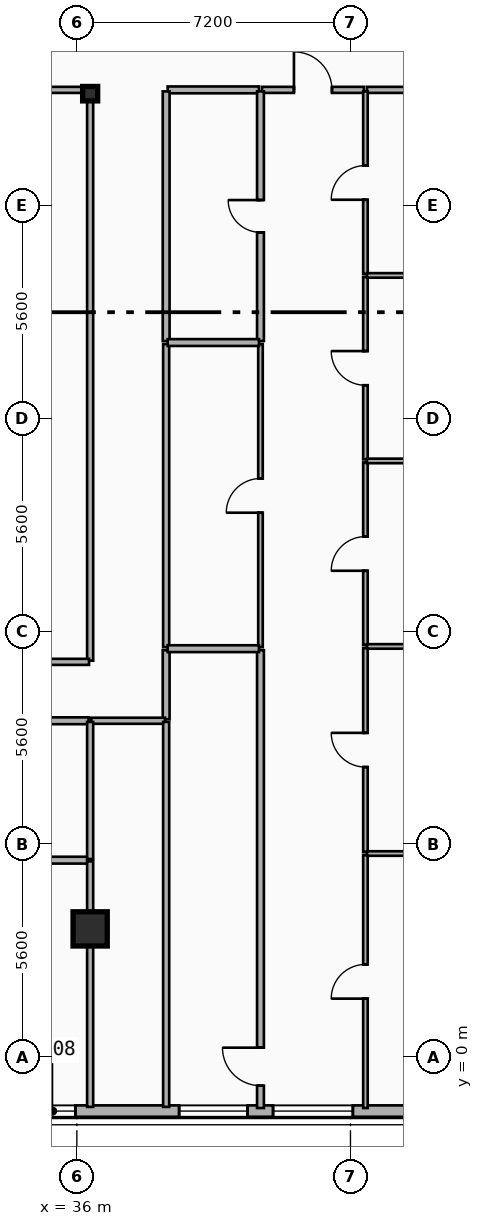
"""IFC4 building model, lengths in metres.
Left out: names, types, materials, properties, quantities, classifications, styles, units other than length and angle.
Written with IfcOpenShell. Run it as: python <this file> out.ifc"""

import sys

from ifc_helpers import new_model, si_unit, direction, frame, frame_2d, origin, origin_2d, place, context, subcontext, project, spatial, rectangle, i_section, extrude, element, fill, save


model = new_model("IFC4")
c1 = context("Model", 3, precision=1e-05, world=origin(), true_north=direction((0.0, 1.0)))
c2 = subcontext(c1, "Body", "Model", "MODEL_VIEW")
j1 = project(units=[si_unit("LENGTHUNIT", "METRE"), si_unit("PLANEANGLEUNIT", "RADIAN")], contexts=[c1])
p1 = place(None, origin())
s1 = spatial("IfcSite", under=j1, at=p1, CompositionType="ELEMENT")
p2 = place(p1, origin())
s2 = spatial("IfcBuilding", under=s1, at=p2, CompositionType="ELEMENT")
p3 = place(p2, frame((0.0, 0.0, 251.0)))
s3 = spatial("IfcBuildingStorey", under=s2, at=p3, CompositionType="ELEMENT", Elevation=251.0)
p4 = place(p3, frame((36.35, 25.35, 0.0), z_axis=(0.0, 0.0, 1.0), x_axis=(1.0, 0.0, 0.0)))
e1 = element("IfcColumn", 1, at=p4, inside=s3, PredefinedType="COLUMN", context=c2, shape_type="SweptSolid", body=[
    extrude(i_section(OverallWidth=0.395, OverallDepth=0.38, WebThickness=0.019, FlangeThickness=0.03, FilletRadius=0.015, at=origin_2d()), origin(), (0.0, 0.0, 1.0), 3.7),
])
p5 = place(p3, frame((36.35, 3.482, 0.0), z_axis=(0.0, -0.090227632116, 0.995921168769), x_axis=(1.0, 0.0, 0.0)))
e2 = element("IfcColumn", 2, at=p5, inside=s3, PredefinedType="COLUMN", context=c2, shape_type="SweptSolid", body=[
    extrude(rectangle(XDim=0.9, YDim=0.9, at=origin_2d()), origin(), (0.0, 0.0, 1.0), 3.715),
])
p6 = place(p3, frame((45.2, -1.42, 0.0), z_axis=(0.0, 0.0, 1.0), x_axis=(-1.0, 0.0, 0.0)))
e3 = element("IfcWall", 3, at=p6, inside=s3, PredefinedType="SOLIDWALL", context=c2, shape_type="SweptSolid", body=[
    extrude(rectangle(XDim=32.8, YDim=0.3, at=frame_2d((16.4, 0.0))), origin(), (0.0, 0.0, 1.0), 3.42),
])
p7 = place(p6, frame((29.071, 0.0, 0.75)))
e4 = element("IfcOpeningElement", 4, at=p7, cuts=e3, PredefinedType="OPENING", context=c2, shape_type="SweptSolid", body=[
    extrude(rectangle(XDim=2.1, YDim=2.1, at=frame_2d((1.05, 1.05))), frame((0.0, 0.16, 0.0), z_axis=(0.0, -1.0, 0.0), x_axis=(1.0, 0.0, 0.0)), (0.0, 0.0, 1.0), 0.32),
])
p8 = place(p6, frame((26.745, 0.0, 0.75)))
e5 = element("IfcOpeningElement", 5, at=p8, cuts=e3, PredefinedType="OPENING", context=c2, shape_type="SweptSolid", body=[
    extrude(rectangle(XDim=1.6, YDim=1.95, at=frame_2d((0.8, 0.975))), frame((0.0, 0.16, 0.0), z_axis=(0.0, -1.0, 0.0), x_axis=(1.0, 0.0, 0.0)), (0.0, 0.0, 1.0), 0.32),
])
p9 = place(p6, frame((18.105, 0.0, 0.75)))
e6 = element("IfcOpeningElement", 6, at=p9, cuts=e3, PredefinedType="OPENING", context=c2, shape_type="SweptSolid", body=[
    extrude(rectangle(XDim=2.1, YDim=2.1, at=frame_2d((1.05, 1.05))), frame((0.0, 0.16, 0.0), z_axis=(0.0, -1.0, 0.0), x_axis=(1.0, 0.0, 0.0)), (0.0, 0.0, 1.0), 0.32),
])
p10 = place(p6, frame((21.762, 0.0, 0.75)))
e7 = element("IfcOpeningElement", 7, at=p10, cuts=e3, PredefinedType="OPENING", context=c2, shape_type="SweptSolid", body=[
    extrude(rectangle(XDim=2.1, YDim=2.1, at=frame_2d((1.05, 1.05))), frame((0.0, 0.16, 0.0), z_axis=(0.0, -1.0, 0.0), x_axis=(1.0, 0.0, 0.0)), (0.0, 0.0, 1.0), 0.32),
])
p11 = place(p6, frame((11.364, 0.0, 0.75)))
e8 = element("IfcOpeningElement", 8, at=p11, cuts=e3, PredefinedType="OPENING", context=c2, shape_type="SweptSolid", body=[
    extrude(rectangle(XDim=2.1, YDim=2.1, at=frame_2d((1.05, 1.05))), frame((0.0, 0.16, 0.0), z_axis=(0.0, -1.0, 0.0), x_axis=(1.0, 0.0, 0.0)), (0.0, 0.0, 1.0), 0.32),
])
p12 = place(p6, frame((9.238, 0.0, 0.68)))
e9 = element("IfcOpeningElement", 9, at=p12, cuts=e3, PredefinedType="OPENING", context=c2, shape_type="SweptSolid", body=[
    extrude(rectangle(XDim=1.2, YDim=1.5, at=frame_2d((0.6, 0.75))), frame((0.0, 0.16, 0.0), z_axis=(0.0, -1.0, 0.0), x_axis=(1.0, 0.0, 0.0)), (0.0, 0.0, 1.0), 0.32),
])
p13 = place(p6, frame((14.669, 0.0, 0.75)))
e10 = element("IfcOpeningElement", 10, at=p13, cuts=e3, PredefinedType="OPENING", context=c2, shape_type="SweptSolid", body=[
    extrude(rectangle(XDim=2.1, YDim=2.1, at=frame_2d((1.05, 1.05))), frame((0.0, 0.16, 0.0), z_axis=(0.0, -1.0, 0.0), x_axis=(1.0, 0.0, 0.0)), (0.0, 0.0, 1.0), 0.32),
])
p14 = place(p6, frame((1.937, 0.0, 0.75)))
e11 = element("IfcOpeningElement", 11, at=p14, cuts=e3, PredefinedType="OPENING", context=c2, shape_type="SweptSolid", body=[
    extrude(rectangle(XDim=2.1, YDim=2.1, at=frame_2d((1.05, 1.05))), frame((0.0, 0.16, 0.0), z_axis=(0.0, -1.0, 0.0), x_axis=(1.0, 0.0, 0.0)), (0.0, 0.0, 1.0), 0.32),
])
p15 = place(p6, frame((4.709, 0.0, 0.8)))
e12 = element("IfcOpeningElement", 12, at=p15, cuts=e3, PredefinedType="OPENING", context=c2, shape_type="SweptSolid", body=[
    extrude(rectangle(XDim=1.8, YDim=1.8, at=frame_2d((0.9, 0.9))), frame((0.0, 0.16, 0.0), z_axis=(0.0, -1.0, 0.0), x_axis=(1.0, 0.0, 0.0)), (0.0, 0.0, 1.0), 0.32),
])
p16 = place(p3, frame((40.872, 25.45, 0.0), z_axis=(0.0, 0.0, 1.0), x_axis=(1.0, 0.0, 0.0)))
e13 = element("IfcWall", 13, at=p16, inside=s3, PredefinedType="PARTITIONING", context=c2, shape_type="SweptSolid", body=[
    extrude(rectangle(XDim=2.682, YDim=0.16, at=frame_2d((1.341, 0.0))), origin(), (0.0, 0.0, 1.0), 3.42),
])
p17 = place(p16, frame((0.841, 0.0, 0.0)))
e14 = element("IfcOpeningElement", 14, at=p17, cuts=e13, PredefinedType="OPENING", context=c2, shape_type="SweptSolid", body=[
    extrude(rectangle(XDim=1.0, YDim=2.15, at=frame_2d((0.5, 1.075))), frame((0.0, 0.09, 0.0), z_axis=(0.0, -1.0, 0.0), x_axis=(1.0, 0.0, 0.0)), (0.0, 0.0, 1.0), 0.18),
])
p18 = place(p3, frame((38.39, 25.45, 0.0), z_axis=(0.0, 0.0, 1.0), x_axis=(1.0, 0.0, 0.0)))
e15 = element("IfcWall", 15, at=p18, inside=s3, PredefinedType="PLUMBINGWALL", context=c2, shape_type="SweptSolid", body=[
    extrude(rectangle(XDim=2.402, YDim=0.18, at=frame_2d((1.201, 0.0))), origin(), (0.0, 0.0, 1.0), 3.42),
])
p19 = place(p3, frame((43.634, 25.45, 0.0), z_axis=(0.0, 0.0, 1.0), x_axis=(1.0, 0.0, 0.0)))
e16 = element("IfcWall", 16, at=p19, inside=s3, PredefinedType="PARTITIONING", context=c2, shape_type="SweptSolid", body=[
    extrude(rectangle(XDim=5.506, YDim=0.16, at=frame_2d((2.753, 0.0))), origin(), (0.0, 0.0, 1.0), 2.7),
])
p20 = place(p3, frame((38.35, 8.89, 0.0), z_axis=(0.0, 0.0, 1.0), x_axis=(0.0, 1.0, 0.0)))
e17 = element("IfcWall", 17, at=p20, inside=s3, PredefinedType="PLUMBINGWALL", context=c2, shape_type="SweptSolid", body=[
    extrude(rectangle(XDim=1.817, YDim=0.18, at=frame_2d((0.909, 0.0))), origin(), (0.0, 0.0, 1.0), 2.9),
])
p21 = place(p3, frame((38.35, 10.787, 0.0), z_axis=(0.0, 0.0, 1.0), x_axis=(0.0, 1.0, 0.0)))
e18 = element("IfcWall", 18, at=p21, inside=s3, PredefinedType="PARTITIONING", context=c2, shape_type="SweptSolid", body=[
    extrude(rectangle(XDim=7.975, YDim=0.16, at=frame_2d((3.987, 0.0))), origin(), (0.0, 0.0, 1.0), 2.9),
])
p22 = place(p3, frame((38.35, 18.842, 0.0), z_axis=(0.0, 0.0, 1.0), x_axis=(0.0, 1.0, 0.0)))
e19 = element("IfcWall", 19, at=p22, inside=s3, PredefinedType="PLUMBINGWALL", context=c2, shape_type="SweptSolid", body=[
    extrude(rectangle(XDim=6.568, YDim=0.18, at=frame_2d((3.284, 0.0))), origin(), (0.0, 0.0, 1.0), 2.9),
])
for number, where, z_axis, x_axis in (
    (20, (34.415, 8.85, 0.0), (0.0, 0.0, 1.0), (1.0, 0.0, 0.0)),
    (21, (34.415, 5.182, 0.0), (0.0, 0.0, 1.0), (1.0, 0.0, 0.0)),
):
    element("IfcWall", number, at=place(p3, frame(where, z_axis=z_axis, x_axis=x_axis)), inside=s3, PredefinedType="PLUMBINGWALL", context=c2, shape_type="SweptSolid", body=[
        extrude(rectangle(XDim=1.895, YDim=0.18, at=frame_2d((0.948, 0.0))), origin(), (0.0, 0.0, 1.0), 2.7),
    ])
p23 = place(p3, frame((40.832, -1.34, 0.0), z_axis=(0.0, 0.0, 1.0), x_axis=(0.0, 1.0, 0.0)))
e22 = element("IfcWall", 22, at=p23, inside=s3, PredefinedType="PLUMBINGWALL", context=c2, shape_type="SweptSolid", body=[
    extrude(rectangle(XDim=12.047, YDim=0.18, at=frame_2d((6.023, 0.0))), origin(), (0.0, 0.0, 1.0), 2.9),
])
p24 = place(p23, frame((0.589, 0.0, 0.0)))
e23 = element("IfcOpeningElement", 23, at=p24, cuts=e22, PredefinedType="OPENING", context=c2, shape_type="SweptSolid", body=[
    extrude(rectangle(XDim=1.0, YDim=2.15, at=frame_2d((0.5, 1.075))), frame((0.0, 0.1, 0.0), z_axis=(0.0, -1.0, 0.0), x_axis=(1.0, 0.0, 0.0)), (0.0, 0.0, 1.0), 0.2),
])
p25 = place(p3, frame((40.832, 10.787, 0.0), z_axis=(0.0, 0.0, 1.0), x_axis=(0.0, 1.0, 0.0)))
e24 = element("IfcWall", 24, at=p25, inside=s3, PredefinedType="PARTITIONING", context=c2, shape_type="SweptSolid", body=[
    extrude(rectangle(XDim=7.975, YDim=0.12, at=frame_2d((3.987, 0.0))), origin(), (0.0, 0.0, 1.0), 2.9),
])
p26 = place(p25, frame((3.538, 0.0, 0.0)))
e25 = element("IfcOpeningElement", 25, at=p26, cuts=e24, PredefinedType="OPENING", context=c2, shape_type="SweptSolid", body=[
    extrude(rectangle(XDim=0.9, YDim=2.1, at=frame_2d((0.45, 1.05))), frame((0.0, 0.07, 0.0), z_axis=(0.0, -1.0, 0.0), x_axis=(1.0, 0.0, 0.0)), (0.0, 0.0, 1.0), 0.14),
])
p27 = place(p3, frame((40.832, 18.842, 0.0), z_axis=(0.0, 0.0, 1.0), x_axis=(0.0, 1.0, 0.0)))
e26 = element("IfcWall", 26, at=p27, inside=s3, PredefinedType="PLUMBINGWALL", context=c2, shape_type="SweptSolid", body=[
    extrude(rectangle(XDim=6.568, YDim=0.18, at=frame_2d((3.284, 0.0))), origin(), (0.0, 0.0, 1.0), 2.9),
])
p28 = place(p27, frame((2.859, 0.0, 0.0)))
e27 = element("IfcOpeningElement", 27, at=p28, cuts=e26, PredefinedType="OPENING", context=c2, shape_type="SweptSolid", body=[
    extrude(rectangle(XDim=0.85, YDim=2.1, at=frame_2d((0.425, 1.05))), frame((0.0, 0.1, 0.0), z_axis=(0.0, -1.0, 0.0), x_axis=(1.0, 0.0, 0.0)), (0.0, 0.0, 1.0), 0.2),
])
p29 = place(p3, frame((43.594, -1.34, 0.0), z_axis=(0.0, 0.0, 1.0), x_axis=(0.0, 1.0, 0.0)))
e28 = element("IfcWall", 28, at=p29, inside=s3, PredefinedType="PARTITIONING", context=c2, shape_type="SweptSolid", body=[
    extrude(rectangle(XDim=6.657, YDim=0.12, at=frame_2d((3.329, 0.0))), origin(), (0.0, 0.0, 1.0), 3.08),
])
p30 = place(p29, frame((2.878, 0.0, 0.0)))
e29 = element("IfcOpeningElement", 29, at=p30, cuts=e28, PredefinedType="OPENING", context=c2, shape_type="SweptSolid", body=[
    extrude(rectangle(XDim=0.9, YDim=2.1, at=frame_2d((0.45, 1.05))), frame((0.0, 0.07, 0.0), z_axis=(0.0, -1.0, 0.0), x_axis=(1.0, 0.0, 0.0)), (0.0, 0.0, 1.0), 0.14),
])
p31 = place(p3, frame((43.594, 5.397, 0.0), z_axis=(0.0, 0.0, 1.0), x_axis=(0.0, 1.0, 0.0)))
e30 = element("IfcWall", 30, at=p31, inside=s3, PredefinedType="PARTITIONING", context=c2, shape_type="SweptSolid", body=[
    extrude(rectangle(XDim=5.369, YDim=0.12, at=frame_2d((2.685, 0.0))), origin(), (0.0, 0.0, 1.0), 2.9),
])
p32 = place(p31, frame((2.235, 0.0, 0.0)))
e31 = element("IfcOpeningElement", 31, at=p32, cuts=e30, PredefinedType="OPENING", context=c2, shape_type="SweptSolid", body=[
    extrude(rectangle(XDim=0.9, YDim=2.1, at=frame_2d((0.45, 1.05))), frame((0.0, 0.07, 0.0), z_axis=(0.0, -1.0, 0.0), x_axis=(1.0, 0.0, 0.0)), (0.0, 0.0, 1.0), 0.14),
])
p33 = place(p3, frame((43.594, 10.846, 0.0), z_axis=(0.0, 0.0, 1.0), x_axis=(0.0, 1.0, 0.0)))
e32 = element("IfcWall", 32, at=p33, inside=s3, PredefinedType="PARTITIONING", context=c2, shape_type="SweptSolid", body=[
    extrude(rectangle(XDim=4.801, YDim=0.12, at=frame_2d((2.4, 0.0))), origin(), (0.0, 0.0, 1.0), 2.9),
])
p34 = place(p33, frame((1.95, 0.0, 0.0)))
e33 = element("IfcOpeningElement", 33, at=p34, cuts=e32, PredefinedType="OPENING", context=c2, shape_type="SweptSolid", body=[
    extrude(rectangle(XDim=0.9, YDim=2.1, at=frame_2d((0.45, 1.05))), frame((0.0, 0.07, 0.0), z_axis=(0.0, -1.0, 0.0), x_axis=(1.0, 0.0, 0.0)), (0.0, 0.0, 1.0), 0.14),
])
p35 = place(p3, frame((43.594, 15.727, 0.0), z_axis=(0.0, 0.0, 1.0), x_axis=(0.0, 1.0, 0.0)))
e34 = element("IfcWall", 34, at=p35, inside=s3, PredefinedType="PARTITIONING", context=c2, shape_type="SweptSolid", body=[
    extrude(rectangle(XDim=4.801, YDim=0.12, at=frame_2d((2.4, 0.0))), origin(), (0.0, 0.0, 1.0), 2.9),
])
p36 = place(p35, frame((1.95, 0.0, 0.0)))
e35 = element("IfcOpeningElement", 35, at=p36, cuts=e34, PredefinedType="OPENING", context=c2, shape_type="SweptSolid", body=[
    extrude(rectangle(XDim=0.9, YDim=2.1, at=frame_2d((0.45, 1.05))), frame((0.0, 0.07, 0.0), z_axis=(0.0, -1.0, 0.0), x_axis=(1.0, 0.0, 0.0)), (0.0, 0.0, 1.0), 0.14),
])
p37 = place(p3, frame((43.594, 20.608, 0.0), z_axis=(0.0, 0.0, 1.0), x_axis=(0.0, 1.0, 0.0)))
e36 = element("IfcWall", 36, at=p37, inside=s3, PredefinedType="PARTITIONING", context=c2, shape_type="SweptSolid", body=[
    extrude(rectangle(XDim=4.802, YDim=0.12, at=frame_2d((2.401, 0.0))), origin(), (0.0, 0.0, 1.0), 3.05),
])
p38 = place(p37, frame((1.951, 0.0, 0.0)))
e37 = element("IfcOpeningElement", 37, at=p38, cuts=e36, PredefinedType="OPENING", context=c2, shape_type="SweptSolid", body=[
    extrude(rectangle(XDim=0.9, YDim=2.1, at=frame_2d((0.45, 1.05))), frame((0.0, 0.07, 0.0), z_axis=(0.0, -1.0, 0.0), x_axis=(1.0, 0.0, 0.0)), (0.0, 0.0, 1.0), 0.14),
])
for number, where, z_axis, x_axis in (
    (38, (38.39, 10.747, 0.0), (0.0, 0.0, 1.0), (1.0, 0.0, 0.0)),
    (39, (38.39, 18.802, 0.0), (0.0, 0.0, 1.0), (1.0, 0.0, 0.0)),
):
    element("IfcWall", number, at=place(p3, frame(where, z_axis=z_axis, x_axis=x_axis)), inside=s3, PredefinedType="PLUMBINGWALL", context=c2, shape_type="SweptSolid", body=[
        extrude(rectangle(XDim=2.402, YDim=0.18, at=frame_2d((1.201, 0.0))), origin(), (0.0, 0.0, 1.0), 2.9),
    ])
for number, where, z_axis, x_axis in (
    (40, (43.634, 5.357, 0.0), (0.0, 0.0, 1.0), (1.0, 0.0, 0.0)),
    (41, (43.634, 10.806, 0.0), (0.0, 0.0, 1.0), (1.0, 0.0, 0.0)),
    (42, (43.634, 15.687, 0.0), (0.0, 0.0, 1.0), (1.0, 0.0, 0.0)),
    (43, (43.634, 20.568, 0.0), (0.0, 0.0, 1.0), (1.0, 0.0, 0.0)),
):
    element("IfcWall", number, at=place(p3, frame(where, z_axis=z_axis, x_axis=x_axis)), inside=s3, PredefinedType="PARTITIONING", context=c2, shape_type="SweptSolid", body=[
        extrude(rectangle(XDim=5.506, YDim=0.12, at=frame_2d((2.753, 0.0))), origin(), (0.0, 0.0, 1.0), 2.7),
    ])
p39 = place(p3, frame((20.48, 25.45, 0.0), z_axis=(0.0, 0.0, 1.0), x_axis=(1.0, 0.0, 0.0)))
e44 = element("IfcWall", 44, at=p39, inside=s3, PredefinedType="PARTITIONING", context=c2, shape_type="SweptSolid", body=[
    extrude(rectangle(XDim=15.84, YDim=0.16, at=frame_2d((7.92, 0.0))), origin(), (0.0, 0.0, 1.0), 2.7),
])
p40 = place(p3, frame((36.38, 8.85, 0.0), z_axis=(0.0, 0.0, 1.0), x_axis=(1.0, 0.0, 0.0)))
e45 = element("IfcWall", 45, at=p40, inside=s3, PredefinedType="PARTITIONING", context=c2, shape_type="SweptSolid", body=[
    extrude(rectangle(XDim=1.94, YDim=0.16, at=frame_2d((0.97, 0.0))), origin(), (0.0, 0.0, 1.0), 2.7),
])
p41 = place(p3, frame((36.35, 10.43, 0.0), z_axis=(0.0, 0.0, 1.0), x_axis=(0.0, 1.0, 0.0)))
e46 = element("IfcWall", 46, at=p41, inside=s3, PredefinedType="PARTITIONING", context=c2, shape_type="SweptSolid", body=[
    extrude(rectangle(XDim=14.99, YDim=0.16, at=frame_2d((7.495, 0.0))), origin(), (0.0, 0.0, 1.0), 2.7),
])
p42 = place(p3, frame((34.48, 10.4, 0.0), z_axis=(0.0, 0.0, 1.0), x_axis=(1.0, 0.0, 0.0)))
e47 = element("IfcWall", 47, at=p42, inside=s3, PredefinedType="PARTITIONING", context=c2, shape_type="SweptSolid", body=[
    extrude(rectangle(XDim=1.84, YDim=0.16, at=frame_2d((0.92, 0.0))), origin(), (0.0, 0.0, 1.0), 2.7),
])
p43 = place(p3, frame((36.35, -1.31, 0.0), z_axis=(0.0, 0.0, 1.0), x_axis=(0.0, 1.0, 0.0)))
e48 = element("IfcWall", 48, at=p43, inside=s3, PredefinedType="PARTITIONING", context=c2, shape_type="SweptSolid", body=[
    extrude(rectangle(XDim=6.462, YDim=0.16, at=frame_2d((3.231, 0.0))), origin(), (0.0, 0.0, 1.0), 2.7),
])
p44 = place(p3, frame((36.35, 5.212, 0.0), z_axis=(0.0, 0.0, 1.0), x_axis=(0.0, 1.0, 0.0)))
e49 = element("IfcWall", 49, at=p44, inside=s3, PredefinedType="PARTITIONING", context=c2, shape_type="SweptSolid", body=[
    extrude(rectangle(XDim=3.608, YDim=0.16, at=frame_2d((1.804, 0.0))), origin(), (0.0, 0.0, 1.0), 2.7),
])
p45 = place(p3, frame((38.35, -1.31, 0.0), z_axis=(0.0, 0.0, 1.0), x_axis=(0.0, 1.0, 0.0)))
e50 = element("IfcWall", 50, at=p45, inside=s3, PredefinedType="PARTITIONING", context=c2, shape_type="SweptSolid", body=[
    extrude(rectangle(XDim=10.13, YDim=0.16, at=frame_2d((5.065, 0.0))), origin(), (0.0, 0.0, 1.0), 3.05),
])
p46 = place(p12, origin())
e51 = element("IfcWindow", 51, at=p46, inside=s3, PartitioningType="SINGLE_PANEL", PredefinedType="WINDOW", context=c2, shape_type="SweptSolid", body=[
    extrude(rectangle(XDim=1.2, YDim=1.5, at=frame_2d((0.6, 0.75))), frame((0.0, 0.03, 0.0), z_axis=(0.0, -1.0, 0.0), x_axis=(1.0, 0.0, 0.0)), (0.0, 0.0, 1.0), 0.06),
])
fill(e9, e51)
p47 = place(p14, origin())
e52 = element("IfcWindow", 52, at=p47, inside=s3, PartitioningType="SINGLE_PANEL", PredefinedType="WINDOW", context=c2, shape_type="SweptSolid", body=[
    extrude(rectangle(XDim=2.1, YDim=2.1, at=frame_2d((1.05, 1.05))), frame((0.0, 0.03, 0.0), z_axis=(0.0, -1.0, 0.0), x_axis=(1.0, 0.0, 0.0)), (0.0, 0.0, 1.0), 0.06),
])
fill(e11, e52)
p48 = place(p15, origin())
e53 = element("IfcWindow", 53, at=p48, inside=s3, PartitioningType="SINGLE_PANEL", PredefinedType="WINDOW", context=c2, shape_type="SweptSolid", body=[
    extrude(rectangle(XDim=1.8, YDim=1.8, at=frame_2d((0.9, 0.9))), frame((0.0, 0.03, 0.0), z_axis=(0.0, -1.0, 0.0), x_axis=(1.0, 0.0, 0.0)), (0.0, 0.0, 1.0), 0.06),
])
fill(e12, e53)
p49 = place(p17, origin())
e54 = element("IfcDoor", 54, at=p49, inside=s3, OperationType="SINGLE_SWING_LEFT", PredefinedType="DOOR", context=c2, shape_type="SweptSolid", body=[
    extrude(rectangle(XDim=1.0, YDim=2.15, at=frame_2d((0.5, 1.075))), frame((0.0, 0.025, 0.0), z_axis=(0.0, -1.0, 0.0), x_axis=(1.0, 0.0, 0.0)), (0.0, 0.0, 1.0), 0.05),
])
fill(e14, e54)
p50 = place(p24, origin())
e55 = element("IfcDoor", 55, at=p50, inside=s3, OperationType="SINGLE_SWING_RIGHT", PredefinedType="DOOR", context=c2, shape_type="SweptSolid", body=[
    extrude(rectangle(XDim=1.0, YDim=2.15, at=frame_2d((0.5, 1.075))), frame((0.0, 0.025, 0.0), z_axis=(0.0, -1.0, 0.0), x_axis=(1.0, 0.0, 0.0)), (0.0, 0.0, 1.0), 0.05),
])
fill(e23, e55)
p51 = place(p26, origin())
e56 = element("IfcDoor", 56, at=p51, inside=s3, OperationType="SINGLE_SWING_LEFT", PredefinedType="DOOR", context=c2, shape_type="SweptSolid", body=[
    extrude(rectangle(XDim=0.9, YDim=2.1, at=frame_2d((0.45, 1.05))), frame((0.0, 0.025, 0.0), z_axis=(0.0, -1.0, 0.0), x_axis=(1.0, 0.0, 0.0)), (0.0, 0.0, 1.0), 0.05),
])
fill(e25, e56)
p52 = place(p28, origin())
e57 = element("IfcDoor", 57, at=p52, inside=s3, OperationType="SINGLE_SWING_RIGHT", PredefinedType="DOOR", context=c2, shape_type="SweptSolid", body=[
    extrude(rectangle(XDim=0.85, YDim=2.1, at=frame_2d((0.425, 1.05))), frame((0.0, 0.025, 0.0), z_axis=(0.0, -1.0, 0.0), x_axis=(1.0, 0.0, 0.0)), (0.0, 0.0, 1.0), 0.05),
])
fill(e27, e57)
p53 = place(p30, origin())
e58 = element("IfcDoor", 58, at=p53, inside=s3, OperationType="SINGLE_SWING_LEFT", PredefinedType="DOOR", context=c2, shape_type="SweptSolid", body=[
    extrude(rectangle(XDim=0.9, YDim=2.1, at=frame_2d((0.45, 1.05))), frame((0.0, 0.025, 0.0), z_axis=(0.0, -1.0, 0.0), x_axis=(1.0, 0.0, 0.0)), (0.0, 0.0, 1.0), 0.05),
])
fill(e29, e58)
p54 = place(p32, origin())
e59 = element("IfcDoor", 59, at=p54, inside=s3, OperationType="SINGLE_SWING_RIGHT", PredefinedType="DOOR", context=c2, shape_type="SweptSolid", body=[
    extrude(rectangle(XDim=0.9, YDim=2.1, at=frame_2d((0.45, 1.05))), frame((0.0, 0.025, 0.0), z_axis=(0.0, -1.0, 0.0), x_axis=(1.0, 0.0, 0.0)), (0.0, 0.0, 1.0), 0.05),
])
fill(e31, e59)
p55 = place(p34, origin())
e60 = element("IfcDoor", 60, at=p55, inside=s3, OperationType="SINGLE_SWING_LEFT", PredefinedType="DOOR", context=c2, shape_type="SweptSolid", body=[
    extrude(rectangle(XDim=0.9, YDim=2.1, at=frame_2d((0.45, 1.05))), frame((0.0, 0.025, 0.0), z_axis=(0.0, -1.0, 0.0), x_axis=(1.0, 0.0, 0.0)), (0.0, 0.0, 1.0), 0.05),
])
fill(e33, e60)
p56 = place(p36, origin())
e61 = element("IfcDoor", 61, at=p56, inside=s3, OperationType="SINGLE_SWING_RIGHT", PredefinedType="DOOR", context=c2, shape_type="SweptSolid", body=[
    extrude(rectangle(XDim=0.9, YDim=2.1, at=frame_2d((0.45, 1.05))), frame((0.0, 0.025, 0.0), z_axis=(0.0, -1.0, 0.0), x_axis=(1.0, 0.0, 0.0)), (0.0, 0.0, 1.0), 0.05),
])
fill(e35, e61)
p57 = place(p38, origin())
e62 = element("IfcDoor", 62, at=p57, inside=s3, OperationType="SINGLE_SWING_LEFT", PredefinedType="DOOR", context=c2, shape_type="SweptSolid", body=[
    extrude(rectangle(XDim=0.9, YDim=2.1, at=frame_2d((0.45, 1.05))), frame((0.0, 0.025, 0.0), z_axis=(0.0, -1.0, 0.0), x_axis=(1.0, 0.0, 0.0)), (0.0, 0.0, 1.0), 0.05),
])
fill(e37, e62)
save(model, sys.argv[1])
